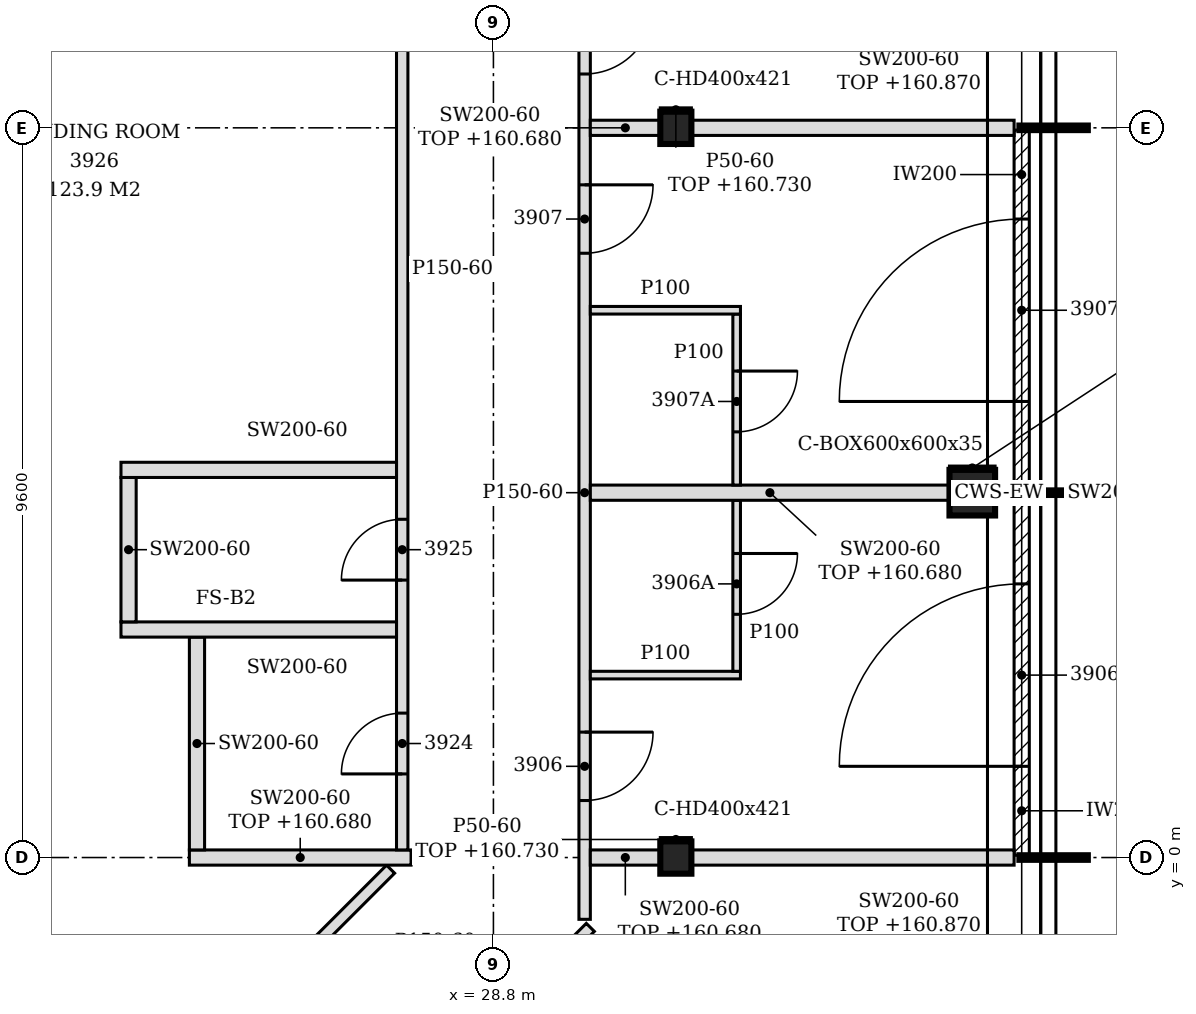
"""IFC4 building model, lengths in metres.
Left out: names, types, materials, properties, quantities, classifications, styles, units other than length and angle.
Written with IfcOpenShell. Run it as: python <this file> out.ifc"""

import sys

from ifc_helpers import new_model, si_unit, direction, frame, frame_2d, origin, origin_2d, place, context, subcontext, project, spatial, polyline, rectangle, hollow_rectangle, i_section, outline, extrude, element, fill, save


model = new_model("IFC4")
c1 = context("Model", 3, precision=1e-05, world=origin(), true_north=direction((0.0, 1.0)))
c2 = subcontext(c1, "Body", "Model", "MODEL_VIEW")
j1 = project(units=[si_unit("LENGTHUNIT", "METRE"), si_unit("PLANEANGLEUNIT", "RADIAN")], contexts=[c1])
p1 = place(None, origin())
s1 = spatial("IfcSite", under=j1, at=p1, CompositionType="ELEMENT")
p2 = place(p1, origin())
s2 = spatial("IfcBuilding", under=s1, at=p2, CompositionType="ELEMENT")
p3 = place(p2, frame((0.0, 0.0, 157.8)))
s3 = spatial("IfcBuildingStorey", under=s2, at=p3, CompositionType="ELEMENT", Elevation=157.8)
p4 = place(p3, frame((35.1, 4.8, -0.15), z_axis=(0.0, 0.0, 1.0), x_axis=(1.0, 0.0, 0.0)))
e1 = element("IfcColumn", 1, at=p4, inside=s3, PredefinedType="COLUMN", context=c2, shape_type="SweptSolid", body=[
    extrude(hollow_rectangle(XDim=0.6, YDim=0.6, WallThickness=0.035, at=origin_2d()), origin(), (0.0, 0.0, 1.0), 3.6),
])
for number, where, z_axis, x_axis in (
    (2, (31.2, 0.0, -0.15), (0.0, 0.0, 1.0), (1.0, 0.0, 0.0)),
    (3, (31.2, 9.6, -0.15), (0.0, 0.0, 1.0), (1.0, 0.0, 0.0)),
):
    element("IfcColumn", number, at=place(p3, frame(where, z_axis=z_axis, x_axis=x_axis)), inside=s3, PredefinedType="COLUMN", context=c2, shape_type="SweptSolid", body=[
        extrude(i_section(OverallWidth=0.409, OverallDepth=0.425, WebThickness=0.033, FlangeThickness=0.052, FilletRadius=0.015, at=origin_2d()), origin(), (0.0, 0.0, 1.0), 3.6),
    ])
p5 = place(p3, frame((35.75, 0.03, 0.0), z_axis=(0.0, 0.0, 1.0), x_axis=(0.0, 1.0, 0.0)))
e4 = element("IfcWall", 4, at=p5, inside=s3, PredefinedType="NOTDEFINED", context=c2, shape_type="SweptSolid", body=[
    extrude(rectangle(XDim=4.74, YDim=0.2, at=frame_2d((2.37, 0.0))), origin(), (0.0, 0.0, 1.0), 3.45),
])
p6 = place(p5, frame((1.17, 0.0, 0.0)))
e5 = element("IfcOpeningElement", 5, at=p6, cuts=e4, PredefinedType="OPENING", context=c2, shape_type="SweptSolid", body=[
    extrude(rectangle(XDim=2.4, YDim=2.4, at=frame_2d((1.2, 1.2))), frame((0.0, 0.11, 0.0), z_axis=(0.0, -1.0, 0.0), x_axis=(1.0, 0.0, 0.0)), (0.0, 0.0, 1.0), 0.22),
])
p7 = place(p3, frame((35.75, 4.83, 0.0), z_axis=(0.0, 0.0, 1.0), x_axis=(0.0, 1.0, 0.0)))
e6 = element("IfcWall", 6, at=p7, inside=s3, PredefinedType="NOTDEFINED", context=c2, shape_type="SweptSolid", body=[
    extrude(rectangle(XDim=4.74, YDim=0.2, at=frame_2d((2.37, 0.0))), origin(), (0.0, 0.0, 1.0), 3.45),
])
p8 = place(p7, frame((1.17, 0.0, 0.0)))
e7 = element("IfcOpeningElement", 7, at=p8, cuts=e6, PredefinedType="OPENING", context=c2, shape_type="SweptSolid", body=[
    extrude(rectangle(XDim=2.4, YDim=2.4, at=frame_2d((1.2, 1.2))), frame((0.0, 0.11, 0.0), z_axis=(0.0, -1.0, 0.0), x_axis=(1.0, 0.0, 0.0)), (0.0, 0.0, 1.0), 0.22),
])
p9 = place(p3, frame((22.722, -8.272, 0.0), z_axis=(0.0, 0.0, 1.0), x_axis=(0.707106781187, 0.707106781187, 0.0)))
e8 = element("IfcWall", 8, at=p9, inside=s3, PredefinedType="PARTITIONING", context=c2, shape_type="SweptSolid", body=[
    extrude(rectangle(XDim=10.399, YDim=0.15, at=frame_2d((5.199, 0.0))), origin(), (0.0, 0.0, 1.0), 2.88),
])
p10 = place(p9, frame((2.846, 0.0, 0.0)))
e9 = element("IfcOpeningElement", 9, at=p10, cuts=e8, PredefinedType="OPENING", context=c2, shape_type="SweptSolid", body=[
    extrude(rectangle(XDim=0.9, YDim=2.1, at=frame_2d((0.45, 1.05))), frame((0.0, 0.085, 0.0), z_axis=(0.0, -1.0, 0.0), x_axis=(1.0, 0.0, 0.0)), (0.0, 0.0, 1.0), 0.17),
])
p11 = place(p9, frame((6.116, 0.0, 0.0)))
e10 = element("IfcOpeningElement", 10, at=p11, cuts=e8, PredefinedType="OPENING", context=c2, shape_type="SweptSolid", body=[
    extrude(rectangle(XDim=0.9, YDim=2.1, at=frame_2d((0.45, 1.05))), frame((0.0, 0.085, 0.0), z_axis=(0.0, -1.0, 0.0), x_axis=(1.0, 0.0, 0.0)), (0.0, 0.0, 1.0), 0.17),
])
p12 = place(p3, frame((21.728, -5.872, 0.0), z_axis=(0.0, 0.0, 1.0), x_axis=(0.707106781187, 0.707106781187, 0.0)))
e11 = element("IfcWall", 11, at=p12, inside=s3, PredefinedType="PARTITIONING", context=c2, shape_type="SweptSolid", body=[
    extrude(rectangle(XDim=8.088, YDim=0.15, at=frame_2d((4.044, 0.0))), origin(), (0.0, 0.0, 1.0), 2.88),
])
p13 = place(p3, frame((30.0, -0.813, 0.0), z_axis=(0.0, 0.0, 1.0), x_axis=(0.0, 1.0, 0.0)))
e12 = element("IfcWall", 12, at=p13, inside=s3, PredefinedType="PARTITIONING", context=c2, shape_type="SweptSolid", body=[
    extrude(outline(polyline([(0.0, 0.0), (12.834, 0.0), (12.834, 3.45), (10.518, 3.45), (10.516, 2.88), (10.308, 2.88), (10.306, 3.45), (5.718, 3.45), (5.716, 2.88), (5.508, 2.88), (5.506, 3.45), (0.918, 3.45), (0.916, 2.88), (0.708, 2.88), (0.706, 3.45), (0.0, 3.45), (0.0, 0.0)])), frame((0.0, 0.075, 0.0), z_axis=(0.0, -1.0, 0.0), x_axis=(1.0, 0.0, 0.0)), (0.0, 0.0, 1.0), 0.15),
])
p14 = place(p13, frame((1.563, 0.0, 0.0)))
e13 = element("IfcOpeningElement", 13, at=p14, cuts=e12, PredefinedType="OPENING", context=c2, shape_type="SweptSolid", body=[
    extrude(rectangle(XDim=0.9, YDim=2.1, at=frame_2d((0.45, 1.05))), frame((0.0, 0.085, 0.0), z_axis=(0.0, -1.0, 0.0), x_axis=(1.0, 0.0, 0.0)), (0.0, 0.0, 1.0), 0.17),
])
p15 = place(p13, frame((8.763, 0.0, 0.0)))
e14 = element("IfcOpeningElement", 14, at=p15, cuts=e12, PredefinedType="OPENING", context=c2, shape_type="SweptSolid", body=[
    extrude(rectangle(XDim=0.9, YDim=2.1, at=frame_2d((0.45, 1.05))), frame((0.0, 0.085, 0.0), z_axis=(0.0, -1.0, 0.0), x_axis=(1.0, 0.0, 0.0)), (0.0, 0.0, 1.0), 0.17),
])
p16 = place(p13, frame((11.121, 0.0, 0.0)))
e15 = element("IfcOpeningElement", 15, at=p16, cuts=e12, PredefinedType="OPENING", context=c2, shape_type="SweptSolid", body=[
    extrude(rectangle(XDim=0.9, YDim=2.1, at=frame_2d((0.45, 1.05))), frame((0.0, 0.085, 0.0), z_axis=(0.0, -1.0, 0.0), x_axis=(1.0, 0.0, 0.0)), (0.0, 0.0, 1.0), 0.17),
])
p17 = place(p3, frame((24.8, 0.0, 0.0), z_axis=(0.0, 0.0, 1.0), x_axis=(1.0, 0.0, 0.0)))
e16 = element("IfcWall", 16, at=p17, inside=s3, PredefinedType="PARTITIONING", context=c2, shape_type="SweptSolid", body=[
    extrude(rectangle(XDim=2.916, YDim=0.2, at=frame_2d((1.458, 0.0))), origin(), (0.0, 0.0, 1.0), 2.88),
])
p18 = place(p3, frame((30.075, 0.0, 0.0), z_axis=(0.0, 0.0, 1.0), x_axis=(1.0, 0.0, 0.0)))
e17 = element("IfcWall", 17, at=p18, inside=s3, PredefinedType="PARTITIONING", context=c2, shape_type="SweptSolid", body=[
    extrude(rectangle(XDim=0.921, YDim=0.2, at=frame_2d((0.46, 0.0))), origin(), (0.0, 0.0, 1.0), 2.88),
])
p19 = place(p3, frame((31.405, 0.0, 0.0), z_axis=(0.0, 0.0, 1.0), x_axis=(1.0, 0.0, 0.0)))
e18 = element("IfcWall", 18, at=p19, inside=s3, PredefinedType="PARTITIONING", context=c2, shape_type="SweptSolid", body=[
    extrude(outline(polyline([(0.0, 0.0), (4.245, 0.0), (4.246, 3.07), (3.845, 3.07), (3.844, 2.93), (3.545, 2.93), (3.543, 3.07), (0.0, 3.07), (0.0, 0.0)])), frame((0.0, 0.1, 0.0), z_axis=(0.0, -1.0, 0.0), x_axis=(1.0, 0.0, 0.0)), (0.0, 0.0, 1.0), 0.2),
])
p20 = place(p3, frame((24.9, 0.1, 0.0), z_axis=(0.0, 0.0, 1.0), x_axis=(0.0, 1.0, 0.0)))
e19 = element("IfcWall", 19, at=p20, inside=s3, PredefinedType="PARTITIONING", context=c2, shape_type="SweptSolid", body=[
    extrude(outline(polyline([(0.0, 0.0), (2.8, 0.0), (2.8, 3.45), (0.005, 3.45), (0.003, 2.88), (0.0, 2.88), (0.0, 0.0)])), frame((0.0, 0.1, 0.0), z_axis=(0.0, -1.0, 0.0), x_axis=(1.0, 0.0, 0.0)), (0.0, 0.0, 1.0), 0.2),
])
p21 = place(p3, frame((27.6, 0.1, 0.0), z_axis=(0.0, 0.0, 1.0), x_axis=(0.0, 1.0, 0.0)))
e20 = element("IfcWall", 20, at=p21, inside=s3, PredefinedType="PARTITIONING", context=c2, shape_type="SweptSolid", body=[
    extrude(outline(polyline([(0.0, 0.0), (10.927, 0.0), (10.927, 3.45), (9.605, 3.45), (9.603, 2.88), (9.395, 2.88), (9.393, 3.45), (4.805, 3.45), (4.803, 2.88), (4.595, 2.88), (4.593, 3.45), (0.005, 3.45), (0.003, 2.88), (0.0, 2.88), (0.0, 0.0)])), frame((0.0, 0.075, 0.0), z_axis=(0.0, -1.0, 0.0), x_axis=(1.0, 0.0, 0.0)), (0.0, 0.0, 1.0), 0.15),
])
p22 = place(p21, frame((1.0, 0.0, 0.0)))
e21 = element("IfcOpeningElement", 21, at=p22, cuts=e20, PredefinedType="OPENING", context=c2, shape_type="SweptSolid", body=[
    extrude(rectangle(XDim=0.8, YDim=2.1, at=frame_2d((0.4, 1.05))), frame((0.0, 0.085, 0.0), z_axis=(0.0, -1.0, 0.0), x_axis=(1.0, 0.0, 0.0)), (0.0, 0.0, 1.0), 0.17),
])
p23 = place(p21, frame((3.55, 0.0, 0.0)))
e22 = element("IfcOpeningElement", 22, at=p23, cuts=e20, PredefinedType="OPENING", context=c2, shape_type="SweptSolid", body=[
    extrude(rectangle(XDim=0.8, YDim=2.1, at=frame_2d((0.4, 1.05))), frame((0.0, 0.085, 0.0), z_axis=(0.0, -1.0, 0.0), x_axis=(1.0, 0.0, 0.0)), (0.0, 0.0, 1.0), 0.17),
])
p24 = place(p3, frame((30.075, 2.4, 0.0), z_axis=(0.0, 0.0, 1.0), x_axis=(1.0, 0.0, 0.0)))
e23 = element("IfcWall", 23, at=p24, inside=s3, PredefinedType="PARTITIONING", context=c2, shape_type="SweptSolid", body=[
    extrude(outline(polyline([(0.0, 0.0), (1.975, 0.0), (1.975, 3.45), (1.275, 3.45), (1.273, 2.93), (0.975, 2.93), (0.973, 3.45), (0.0, 3.45), (0.0, 0.0)])), frame((0.0, 0.05, 0.0), z_axis=(0.0, -1.0, 0.0), x_axis=(1.0, 0.0, 0.0)), (0.0, 0.0, 1.0), 0.1),
])
p25 = place(p3, frame((32.0, 2.45, 0.0), z_axis=(0.0, 0.0, 1.0), x_axis=(0.0, 1.0, 0.0)))
e24 = element("IfcWall", 24, at=p25, inside=s3, PredefinedType="PARTITIONING", context=c2, shape_type="SweptSolid", body=[
    extrude(rectangle(XDim=2.25, YDim=0.1, at=frame_2d((1.125, 0.0))), origin(), (0.0, 0.0, 1.0), 3.45),
])
p26 = place(p25, frame((0.75, 0.0, 0.0)))
e25 = element("IfcOpeningElement", 25, at=p26, cuts=e24, PredefinedType="OPENING", context=c2, shape_type="SweptSolid", body=[
    extrude(rectangle(XDim=0.8, YDim=2.1, at=frame_2d((0.4, 1.05))), frame((0.0, 0.06, 0.0), z_axis=(0.0, -1.0, 0.0), x_axis=(1.0, 0.0, 0.0)), (0.0, 0.0, 1.0), 0.12),
])
p27 = place(p3, frame((23.9, 3.0, 0.0), z_axis=(0.0, 0.0, 1.0), x_axis=(1.0, 0.0, 0.0)))
e26 = element("IfcWall", 26, at=p27, inside=s3, PredefinedType="PARTITIONING", context=c2, shape_type="SweptSolid", body=[
    extrude(rectangle(XDim=3.625, YDim=0.2, at=frame_2d((1.812, 0.0))), origin(), (0.0, 0.0, 1.0), 3.45),
])
p28 = place(p3, frame((24.0, 3.1, 0.0), z_axis=(0.0, 0.0, 1.0), x_axis=(0.0, 1.0, 0.0)))
e27 = element("IfcWall", 27, at=p28, inside=s3, PredefinedType="PARTITIONING", context=c2, shape_type="SweptSolid", body=[
    extrude(outline(polyline([(0.0, 0.0), (1.9, 0.0), (1.9, 3.45), (1.805, 3.45), (1.803, 2.88), (1.595, 2.88), (1.593, 3.45), (0.0, 3.45), (0.0, 0.0)])), frame((0.0, 0.1, 0.0), z_axis=(0.0, -1.0, 0.0), x_axis=(1.0, 0.0, 0.0)), (0.0, 0.0, 1.0), 0.2),
])
p29 = place(p3, frame((30.075, 4.8, 0.0), z_axis=(0.0, 0.0, 1.0), x_axis=(1.0, 0.0, 0.0)))
e28 = element("IfcWall", 28, at=p29, inside=s3, PredefinedType="PARTITIONING", context=c2, shape_type="SweptSolid", body=[
    extrude(rectangle(XDim=4.725, YDim=0.2, at=frame_2d((2.363, 0.0))), origin(), (0.0, 0.0, 1.0), 2.88),
])
p30 = place(p3, frame((35.4, 4.8, 0.0), z_axis=(0.0, 0.0, 1.0), x_axis=(1.0, 0.0, 0.0)))
e29 = element("IfcWall", 29, at=p30, inside=s3, PredefinedType="PARTITIONING", context=c2, shape_type="SweptSolid", body=[
    extrude(rectangle(XDim=0.25, YDim=0.2, at=frame_2d((0.125, 0.0))), origin(), (0.0, 0.0, 1.0), 3.45),
])
p31 = place(p3, frame((32.0, 4.9, 0.0), z_axis=(0.0, 0.0, 1.0), x_axis=(0.0, 1.0, 0.0)))
e30 = element("IfcWall", 30, at=p31, inside=s3, PredefinedType="PARTITIONING", context=c2, shape_type="SweptSolid", body=[
    extrude(rectangle(XDim=2.25, YDim=0.1, at=frame_2d((1.125, 0.0))), origin(), (0.0, 0.0, 1.0), 3.45),
])
p32 = place(p31, frame((0.7, 0.0, 0.0)))
e31 = element("IfcOpeningElement", 31, at=p32, cuts=e30, PredefinedType="OPENING", context=c2, shape_type="SweptSolid", body=[
    extrude(rectangle(XDim=0.8, YDim=2.1, at=frame_2d((0.4, 1.05))), frame((0.0, 0.06, 0.0), z_axis=(0.0, -1.0, 0.0), x_axis=(1.0, 0.0, 0.0)), (0.0, 0.0, 1.0), 0.12),
])
p33 = place(p3, frame((23.9, 5.1, 0.0), z_axis=(0.0, 0.0, 1.0), x_axis=(1.0, 0.0, 0.0)))
e32 = element("IfcWall", 32, at=p33, inside=s3, PredefinedType="PARTITIONING", context=c2, shape_type="SweptSolid", body=[
    extrude(rectangle(XDim=3.625, YDim=0.2, at=frame_2d((1.812, 0.0))), origin(), (0.0, 0.0, 1.0), 3.45),
])
p34 = place(p3, frame((30.075, 7.2, 0.0), z_axis=(0.0, 0.0, 1.0), x_axis=(1.0, 0.0, 0.0)))
e33 = element("IfcWall", 33, at=p34, inside=s3, PredefinedType="PARTITIONING", context=c2, shape_type="SweptSolid", body=[
    extrude(outline(polyline([(0.0, 0.0), (1.975, 0.0), (1.975, 3.45), (1.275, 3.45), (1.273, 2.93), (0.975, 2.93), (0.973, 3.45), (0.0, 3.45), (0.0, 0.0)])), frame((0.0, 0.05, 0.0), z_axis=(0.0, -1.0, 0.0), x_axis=(1.0, 0.0, 0.0)), (0.0, 0.0, 1.0), 0.1),
])
p35 = place(p3, frame((30.075, 9.6, 0.0), z_axis=(0.0, 0.0, 1.0), x_axis=(1.0, 0.0, 0.0)))
e34 = element("IfcWall", 34, at=p35, inside=s3, PredefinedType="PARTITIONING", context=c2, shape_type="SweptSolid", body=[
    extrude(rectangle(XDim=0.921, YDim=0.2, at=frame_2d((0.46, 0.0))), origin(), (0.0, 0.0, 1.0), 2.88),
])
p36 = place(p3, frame((31.405, 9.6, 0.0), z_axis=(0.0, 0.0, 1.0), x_axis=(1.0, 0.0, 0.0)))
e35 = element("IfcWall", 35, at=p36, inside=s3, PredefinedType="PARTITIONING", context=c2, shape_type="SweptSolid", body=[
    extrude(outline(polyline([(0.0, 0.0), (4.245, 0.0), (4.246, 3.07), (3.845, 3.07), (3.844, 2.93), (3.545, 2.93), (3.543, 3.07), (0.0, 3.07), (0.0, 0.0)])), frame((0.0, 0.1, 0.0), z_axis=(0.0, -1.0, 0.0), x_axis=(1.0, 0.0, 0.0)), (0.0, 0.0, 1.0), 0.2),
])
p37 = place(p3, frame((30.996, 0.238, 0.0), z_axis=(0.0, 0.0, 1.0), x_axis=(1.0, 0.0, 0.0)))
e36 = element("IfcWall", 36, at=p37, inside=s3, PredefinedType="PARTITIONING", context=c2, shape_type="SweptSolid", body=[
    extrude(rectangle(XDim=0.409, YDim=0.05, at=frame_2d((0.205, 0.0))), origin(), (0.0, 0.0, 1.0), 2.93),
])
p38 = place(p3, frame((34.8, 5.125, 0.0), z_axis=(0.0, 0.0, 1.0), x_axis=(1.0, 0.0, 0.0)))
e37 = element("IfcWall", 37, at=p38, inside=s3, PredefinedType="PARTITIONING", context=c2, shape_type="SweptSolid", body=[
    extrude(rectangle(XDim=0.6, YDim=0.05, at=frame_2d((0.3, 0.0))), origin(), (0.0, 0.0, 1.0), 2.93),
])
p39 = place(p3, frame((30.996, 9.837, 0.0), z_axis=(0.0, 0.0, 1.0), x_axis=(1.0, 0.0, 0.0)))
e38 = element("IfcWall", 38, at=p39, inside=s3, PredefinedType="PARTITIONING", context=c2, shape_type="SweptSolid", body=[
    extrude(rectangle(XDim=0.409, YDim=0.05, at=frame_2d((0.205, 0.0))), origin(), (0.0, 0.0, 1.0), 2.93),
])
p40 = place(p6, origin())
e39 = element("IfcDoor", 39, at=p40, inside=s3, OperationType="SINGLE_SWING_LEFT", PredefinedType="DOOR", context=c2, shape_type="SweptSolid", body=[
    extrude(rectangle(XDim=2.4, YDim=2.4, at=frame_2d((1.2, 1.2))), frame((0.0, 0.025, 0.0), z_axis=(0.0, -1.0, 0.0), x_axis=(1.0, 0.0, 0.0)), (0.0, 0.0, 1.0), 0.05),
])
fill(e5, e39)
p41 = place(p8, origin())
e40 = element("IfcDoor", 40, at=p41, inside=s3, OperationType="SINGLE_SWING_LEFT", PredefinedType="DOOR", context=c2, shape_type="SweptSolid", body=[
    extrude(rectangle(XDim=2.4, YDim=2.4, at=frame_2d((1.2, 1.2))), frame((0.0, 0.025, 0.0), z_axis=(0.0, -1.0, 0.0), x_axis=(1.0, 0.0, 0.0)), (0.0, 0.0, 1.0), 0.05),
])
fill(e7, e40)
p42 = place(p14, frame((0.9, 0.0, 0.0), z_axis=(0.0, 0.0, 1.0), x_axis=(-1.0, 0.0, 0.0)))
e41 = element("IfcDoor", 41, at=p42, inside=s3, OperationType="SINGLE_SWING_LEFT", PredefinedType="DOOR", context=c2, shape_type="SweptSolid", body=[
    extrude(rectangle(XDim=0.9, YDim=2.1, at=frame_2d((0.45, 1.05))), frame((0.0, 0.025, 0.0), z_axis=(0.0, -1.0, 0.0), x_axis=(1.0, 0.0, 0.0)), (0.0, 0.0, 1.0), 0.05),
])
fill(e13, e41)
p43 = place(p26, frame((0.8, 0.0, 0.0), z_axis=(0.0, 0.0, 1.0), x_axis=(-1.0, 0.0, 0.0)))
e42 = element("IfcDoor", 42, at=p43, inside=s3, OperationType="SINGLE_SWING_LEFT", PredefinedType="DOOR", context=c2, shape_type="SweptSolid", body=[
    extrude(rectangle(XDim=0.8, YDim=2.1, at=frame_2d((0.4, 1.05))), frame((0.0, 0.025, 0.0), z_axis=(0.0, -1.0, 0.0), x_axis=(1.0, 0.0, 0.0)), (0.0, 0.0, 1.0), 0.05),
])
fill(e25, e42)
p44 = place(p15, frame((0.9, 0.0, 0.0), z_axis=(0.0, 0.0, 1.0), x_axis=(-1.0, 0.0, 0.0)))
e43 = element("IfcDoor", 43, at=p44, inside=s3, OperationType="SINGLE_SWING_LEFT", PredefinedType="DOOR", context=c2, shape_type="SweptSolid", body=[
    extrude(rectangle(XDim=0.9, YDim=2.1, at=frame_2d((0.45, 1.05))), frame((0.0, 0.025, 0.0), z_axis=(0.0, -1.0, 0.0), x_axis=(1.0, 0.0, 0.0)), (0.0, 0.0, 1.0), 0.05),
])
fill(e14, e43)
p45 = place(p32, frame((0.8, 0.0, 0.0), z_axis=(0.0, 0.0, 1.0), x_axis=(-1.0, 0.0, 0.0)))
e44 = element("IfcDoor", 44, at=p45, inside=s3, OperationType="SINGLE_SWING_LEFT", PredefinedType="DOOR", context=c2, shape_type="SweptSolid", body=[
    extrude(rectangle(XDim=0.8, YDim=2.1, at=frame_2d((0.4, 1.05))), frame((0.0, 0.025, 0.0), z_axis=(0.0, -1.0, 0.0), x_axis=(1.0, 0.0, 0.0)), (0.0, 0.0, 1.0), 0.05),
])
fill(e31, e44)
p46 = place(p16, frame((0.9, 0.0, 0.0), z_axis=(0.0, 0.0, 1.0), x_axis=(-1.0, 0.0, 0.0)))
e45 = element("IfcDoor", 45, at=p46, inside=s3, OperationType="SINGLE_SWING_LEFT", PredefinedType="DOOR", context=c2, shape_type="SweptSolid", body=[
    extrude(rectangle(XDim=0.9, YDim=2.1, at=frame_2d((0.45, 1.05))), frame((0.0, 0.025, 0.0), z_axis=(0.0, -1.0, 0.0), x_axis=(1.0, 0.0, 0.0)), (0.0, 0.0, 1.0), 0.05),
])
fill(e15, e45)
p47 = place(p22, origin())
e46 = element("IfcDoor", 46, at=p47, inside=s3, OperationType="SINGLE_SWING_LEFT", PredefinedType="DOOR", context=c2, shape_type="SweptSolid", body=[
    extrude(rectangle(XDim=0.8, YDim=2.1, at=frame_2d((0.4, 1.05))), frame((0.0, 0.025, 0.0), z_axis=(0.0, -1.0, 0.0), x_axis=(1.0, 0.0, 0.0)), (0.0, 0.0, 1.0), 0.05),
])
fill(e21, e46)
p48 = place(p23, origin())
e47 = element("IfcDoor", 47, at=p48, inside=s3, OperationType="SINGLE_SWING_LEFT", PredefinedType="DOOR", context=c2, shape_type="SweptSolid", body=[
    extrude(rectangle(XDim=0.8, YDim=2.1, at=frame_2d((0.4, 1.05))), frame((0.0, 0.025, 0.0), z_axis=(0.0, -1.0, 0.0), x_axis=(1.0, 0.0, 0.0)), (0.0, 0.0, 1.0), 0.05),
])
fill(e22, e47)
save(model, sys.argv[1])
